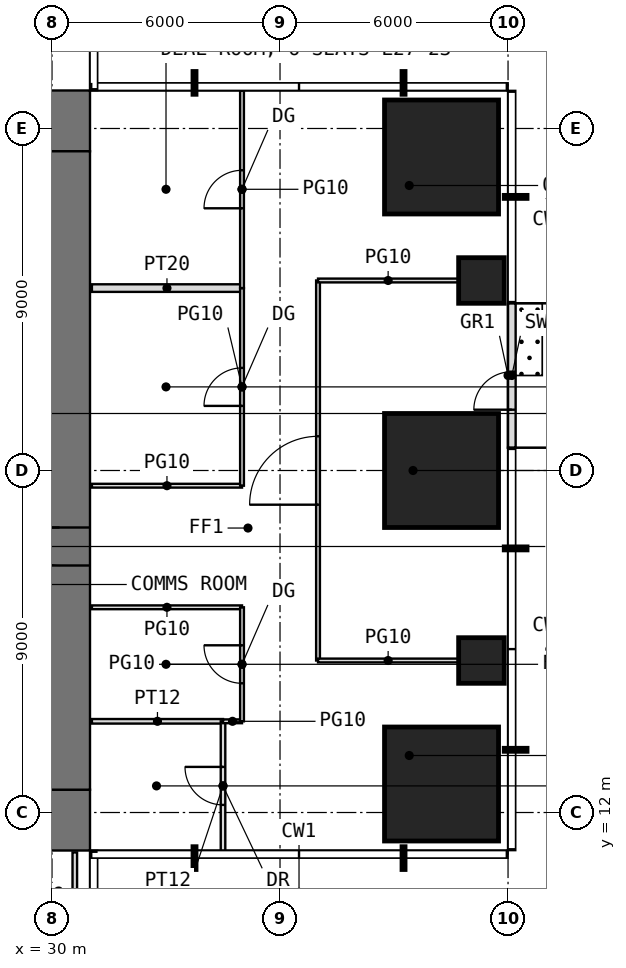
"""IFC4 building model, lengths in metres.
Left out: names, types, materials, properties, quantities, classifications, styles, units other than length and angle.
Written with IfcOpenShell. Run it as: python <this file> out.ifc"""

import sys

from ifc_helpers import new_model, si_unit, direction, frame, frame_2d, origin, origin_2d, place, context, subcontext, project, spatial, rectangle, extrude, element, fill, save


model = new_model("IFC4")
c1 = context("Model", 3, precision=1e-05, world=origin(), true_north=direction((0.0, 1.0)))
c2 = subcontext(c1, "Body", "Model", "MODEL_VIEW")
j1 = project(units=[si_unit("LENGTHUNIT", "METRE"), si_unit("PLANEANGLEUNIT", "RADIAN")], contexts=[c1])
p1 = place(None, origin())
s1 = spatial("IfcSite", under=j1, at=p1, CompositionType="ELEMENT")
p2 = place(p1, origin())
s2 = spatial("IfcBuilding", under=s1, at=p2, CompositionType="ELEMENT")
p3 = place(p2, frame((0.0, 0.0, 116.5)))
s3 = spatial("IfcBuildingStorey", under=s2, at=p3, CompositionType="ELEMENT", Elevation=116.5)
p4 = place(p3, frame((40.25, 12.75, 0.0), z_axis=(0.0, 0.0, 1.0), x_axis=(1.0, 0.0, 0.0)))
e1 = element("IfcColumn", 1, at=p4, inside=s3, PredefinedType="COLUMN", context=c2, shape_type="SweptSolid", body=[
    extrude(rectangle(XDim=3.0, YDim=3.0, at=origin_2d()), origin(), (0.0, 0.0, 1.0), 4.0),
])
p5 = place(p3, frame((41.3, 16.0, 0.0), z_axis=(0.0, 0.0, 1.0), x_axis=(1.0, 0.0, 0.0)))
e2 = element("IfcColumn", 2, at=p5, inside=s3, PredefinedType="COLUMN", context=c2, shape_type="SweptSolid", body=[
    extrude(rectangle(XDim=1.2, YDim=1.2, at=origin_2d()), origin(), (0.0, 0.0, 1.0), 4.0),
])
p6 = place(p3, frame((40.25, 21.0, 0.0), z_axis=(0.0, 0.0, 1.0), x_axis=(1.0, 0.0, 0.0)))
e3 = element("IfcColumn", 3, at=p6, inside=s3, PredefinedType="COLUMN", context=c2, shape_type="SweptSolid", body=[
    extrude(rectangle(XDim=3.0, YDim=3.0, at=origin_2d()), origin(), (0.0, 0.0, 1.0), 4.0),
])
p7 = place(p3, frame((41.3, 26.0, 0.0), z_axis=(0.0, 0.0, 1.0), x_axis=(1.0, 0.0, 0.0)))
e4 = element("IfcColumn", 4, at=p7, inside=s3, PredefinedType="COLUMN", context=c2, shape_type="SweptSolid", body=[
    extrude(rectangle(XDim=1.2, YDim=1.2, at=origin_2d()), origin(), (0.0, 0.0, 1.0), 4.0),
])
p8 = place(p3, frame((40.25, 29.25, 0.0), z_axis=(0.0, 0.0, 1.0), x_axis=(1.0, 0.0, 0.0)))
e5 = element("IfcColumn", 5, at=p8, inside=s3, PredefinedType="COLUMN", context=c2, shape_type="SweptSolid", body=[
    extrude(rectangle(XDim=3.0, YDim=3.0, at=origin_2d()), origin(), (0.0, 0.0, 1.0), 4.0),
])
p9 = place(p3, frame((42.1, 21.6, 0.0), z_axis=(0.0, 0.0, 1.0), x_axis=(0.0, 1.0, 0.0)))
e6 = element("IfcWall", 6, at=p9, inside=s3, PredefinedType="USERDEFINED", context=c2, shape_type="SweptSolid", body=[
    extrude(rectangle(XDim=3.8, YDim=0.2, at=frame_2d((1.9, 0.0))), origin(), (0.0, 0.0, 1.0), 3.75),
])
p10 = place(p9, frame((1.0, 0.0, 0.0)))
e7 = element("IfcOpeningElement", 7, at=p10, cuts=e6, PredefinedType="OPENING", context=c2, shape_type="SweptSolid", body=[
    extrude(rectangle(XDim=1.0, YDim=2.4, at=frame_2d((0.5, 1.2))), frame((0.0, 0.11, 0.0), z_axis=(0.0, -1.0, 0.0), x_axis=(1.0, 0.0, 0.0)), (0.0, 0.0, 1.0), 0.22),
])
p11 = place(p3, frame((11.0, 11.8, -0.05), z_axis=(0.0, 0.0, 1.0), x_axis=(1.0, 0.0, 0.0)))
e8 = element("IfcWall", 8, at=p11, inside=s3, PredefinedType="SHEAR", context=c2, shape_type="SweptSolid", body=[
    extrude(rectangle(XDim=20.0, YDim=1.6, at=frame_2d((10.0, 0.0))), origin(), (0.0, 0.0, 1.0), 4.0),
])
p12 = place(p11, frame((9.0, 0.0, 0.05)))
e9 = element("IfcOpeningElement", 9, at=p12, cuts=e8, PredefinedType="OPENING", context=c2, shape_type="SweptSolid", body=[
    extrude(rectangle(XDim=2.0, YDim=2.2, at=frame_2d((1.0, 1.1))), frame((0.0, 0.81, 0.0), z_axis=(0.0, -1.0, 0.0), x_axis=(1.0, 0.0, 0.0)), (0.0, 0.0, 1.0), 1.62),
])
p13 = place(p3, frame((11.0, 30.2, -0.05), z_axis=(0.0, 0.0, 1.0), x_axis=(1.0, 0.0, 0.0)))
e10 = element("IfcWall", 10, at=p13, inside=s3, PredefinedType="SHEAR", context=c2, shape_type="SweptSolid", body=[
    extrude(rectangle(XDim=20.0, YDim=1.6, at=frame_2d((10.0, 0.0))), origin(), (0.0, 0.0, 1.0), 4.0),
])
p14 = place(p13, frame((9.0, 0.0, 0.05)))
e11 = element("IfcOpeningElement", 11, at=p14, cuts=e10, PredefinedType="OPENING", context=c2, shape_type="SweptSolid", body=[
    extrude(rectangle(XDim=2.0, YDim=2.2, at=frame_2d((1.0, 1.1))), frame((0.0, 0.81, 0.0), z_axis=(0.0, -1.0, 0.0), x_axis=(1.0, 0.0, 0.0)), (0.0, 0.0, 1.0), 1.62),
])
p15 = place(p3, frame((30.2, 12.6, -0.05), z_axis=(0.0, 0.0, 1.0), x_axis=(0.0, 1.0, 0.0)))
e12 = element("IfcWall", 12, at=p15, inside=s3, PredefinedType="SHEAR", context=c2, shape_type="SweptSolid", body=[
    extrude(rectangle(XDim=16.8, YDim=1.6, at=frame_2d((8.4, 0.0))), origin(), (0.0, 0.0, 1.0), 4.0),
])
p16 = place(p15, frame((5.9, 0.0, 0.05)))
e13 = element("IfcOpeningElement", 13, at=p16, cuts=e12, PredefinedType="OPENING", context=c2, shape_type="SweptSolid", body=[
    extrude(rectangle(XDim=1.0, YDim=2.2, at=frame_2d((0.5, 1.1))), frame((0.0, 0.81, 0.0), z_axis=(0.0, -1.0, 0.0), x_axis=(1.0, 0.0, 0.0)), (0.0, 0.0, 1.0), 1.62),
])
for number, where, z_axis, x_axis in (
    (14, (30.6, 7.5, 0.0), (0.0, 0.0, 1.0), (0.0, 1.0, 0.0)),
    (15, (31.05, 14.4, 0.0), (0.0, 0.0, 1.0), (1.0, 0.0, 0.0)),
):
    element("IfcWall", number, at=place(p3, frame(where, z_axis=z_axis, x_axis=x_axis)), inside=s3, PredefinedType="PARTITIONING", context=c2, shape_type="SweptSolid", body=[
        extrude(rectangle(XDim=3.45, YDim=0.12, at=frame_2d((1.725, 0.0))), origin(), (0.0, 0.0, 1.0), 3.75),
    ])
for number, where, z_axis, x_axis in (
    (16, (31.05, 17.4, 0.0), (0.0, 0.0, 1.0), (1.0, 0.0, 0.0)),
    (17, (31.05, 20.6, 0.0), (0.0, 0.0, 1.0), (1.0, 0.0, 0.0)),
):
    element("IfcWall", number, at=place(p3, frame(where, z_axis=z_axis, x_axis=x_axis)), inside=s3, PredefinedType="PARTITIONING", context=c2, shape_type="SweptSolid", body=[
        extrude(rectangle(XDim=3.95, YDim=0.1, at=frame_2d((1.975, 0.0))), origin(), (0.0, 0.0, 1.0), 3.75),
    ])
p17 = place(p3, frame((31.05, 25.8, 0.0), z_axis=(0.0, 0.0, 1.0), x_axis=(1.0, 0.0, 0.0)))
e18 = element("IfcWall", 18, at=p17, inside=s3, PredefinedType="PARTITIONING", context=c2, shape_type="SweptSolid", body=[
    extrude(rectangle(XDim=3.95, YDim=0.2, at=frame_2d((1.975, 0.0))), origin(), (0.0, 0.0, 1.0), 3.75),
])
p18 = place(p3, frame((34.5, 11.0, 0.0), z_axis=(0.0, 0.0, 1.0), x_axis=(0.0, 1.0, 0.0)))
e19 = element("IfcWall", 19, at=p18, inside=s3, PredefinedType="PARTITIONING", context=c2, shape_type="SweptSolid", body=[
    extrude(rectangle(XDim=3.4, YDim=0.12, at=frame_2d((1.7, 0.0))), origin(), (0.0, 0.0, 1.0), 3.75),
])
p19 = place(p18, frame((1.2, 0.0, 0.0)))
e20 = element("IfcOpeningElement", 20, at=p19, cuts=e19, PredefinedType="OPENING", context=c2, shape_type="SweptSolid", body=[
    extrude(rectangle(XDim=1.0, YDim=2.2, at=frame_2d((0.5, 1.1))), frame((0.0, 0.07, 0.0), z_axis=(0.0, -1.0, 0.0), x_axis=(1.0, 0.0, 0.0)), (0.0, 0.0, 1.0), 0.14),
])
p20 = place(p3, frame((34.5, 14.4, 0.0), z_axis=(0.0, 0.0, 1.0), x_axis=(1.0, 0.0, 0.0)))
e21 = element("IfcWall", 21, at=p20, inside=s3, PredefinedType="PARTITIONING", context=c2, shape_type="SweptSolid", body=[
    extrude(rectangle(XDim=0.5, YDim=0.1, at=frame_2d((0.25, 0.0))), origin(), (0.0, 0.0, 1.0), 3.75),
])
p21 = place(p3, frame((35.0, 14.4, 0.0), z_axis=(0.0, 0.0, 1.0), x_axis=(0.0, 1.0, 0.0)))
e22 = element("IfcWall", 22, at=p21, inside=s3, PredefinedType="PARTITIONING", context=c2, shape_type="SweptSolid", body=[
    extrude(rectangle(XDim=3.0, YDim=0.1, at=frame_2d((1.5, 0.0))), origin(), (0.0, 0.0, 1.0), 3.75),
])
p22 = place(p21, frame((1.0, 0.0, 0.0)))
e23 = element("IfcOpeningElement", 23, at=p22, cuts=e22, PredefinedType="OPENING", context=c2, shape_type="SweptSolid", body=[
    extrude(rectangle(XDim=1.0, YDim=2.4, at=frame_2d((0.5, 1.2))), frame((0.0, 0.06, 0.0), z_axis=(0.0, -1.0, 0.0), x_axis=(1.0, 0.0, 0.0)), (0.0, 0.0, 1.0), 0.12),
])
p23 = place(p3, frame((35.0, 20.6, 0.0), z_axis=(0.0, 0.0, 1.0), x_axis=(0.0, 1.0, 0.0)))
e24 = element("IfcWall", 24, at=p23, inside=s3, PredefinedType="PARTITIONING", context=c2, shape_type="SweptSolid", body=[
    extrude(rectangle(XDim=5.2, YDim=0.1, at=frame_2d((2.6, 0.0))), origin(), (0.0, 0.0, 1.0), 3.75),
])
p24 = place(p23, frame((2.1, 0.0, 0.0)))
e25 = element("IfcOpeningElement", 25, at=p24, cuts=e24, PredefinedType="OPENING", context=c2, shape_type="SweptSolid", body=[
    extrude(rectangle(XDim=1.0, YDim=2.4, at=frame_2d((0.5, 1.2))), frame((0.0, 0.06, 0.0), z_axis=(0.0, -1.0, 0.0), x_axis=(1.0, 0.0, 0.0)), (0.0, 0.0, 1.0), 0.12),
])
p25 = place(p3, frame((35.0, 25.8, 0.0), z_axis=(0.0, 0.0, 1.0), x_axis=(0.0, 1.0, 0.0)))
e26 = element("IfcWall", 26, at=p25, inside=s3, PredefinedType="PARTITIONING", context=c2, shape_type="SweptSolid", body=[
    extrude(rectangle(XDim=5.2, YDim=0.1, at=frame_2d((2.6, 0.0))), origin(), (0.0, 0.0, 1.0), 3.75),
])
p26 = place(p25, frame((2.1, 0.0, 0.0)))
e27 = element("IfcOpeningElement", 27, at=p26, cuts=e26, PredefinedType="OPENING", context=c2, shape_type="SweptSolid", body=[
    extrude(rectangle(XDim=1.0, YDim=2.4, at=frame_2d((0.5, 1.2))), frame((0.0, 0.06, 0.0), z_axis=(0.0, -1.0, 0.0), x_axis=(1.0, 0.0, 0.0)), (0.0, 0.0, 1.0), 0.12),
])
p27 = place(p3, frame((37.0, 16.0, 0.0), z_axis=(0.0, 0.0, 1.0), x_axis=(0.0, 1.0, 0.0)))
e28 = element("IfcWall", 28, at=p27, inside=s3, PredefinedType="PARTITIONING", context=c2, shape_type="SweptSolid", body=[
    extrude(rectangle(XDim=10.0, YDim=0.1, at=frame_2d((5.0, 0.0))), origin(), (0.0, 0.0, 1.0), 3.75),
])
p28 = place(p27, frame((4.1, 0.0, 0.0)))
e29 = element("IfcOpeningElement", 29, at=p28, cuts=e28, PredefinedType="OPENING", context=c2, shape_type="SweptSolid", body=[
    extrude(rectangle(XDim=1.8, YDim=2.4, at=frame_2d((0.9, 1.2))), frame((0.0, 0.06, 0.0), z_axis=(0.0, -1.0, 0.0), x_axis=(1.0, 0.0, 0.0)), (0.0, 0.0, 1.0), 0.12),
])
for number, where, z_axis, x_axis in (
    (30, (37.0, 16.0, 0.0), (0.0, 0.0, 1.0), (1.0, 0.0, 0.0)),
    (31, (37.0, 26.0, 0.0), (0.0, 0.0, 1.0), (1.0, 0.0, 0.0)),
):
    element("IfcWall", number, at=place(p3, frame(where, z_axis=z_axis, x_axis=x_axis)), inside=s3, PredefinedType="PARTITIONING", context=c2, shape_type="SweptSolid", body=[
        extrude(rectangle(XDim=3.69, YDim=0.1, at=frame_2d((1.845, 0.0))), origin(), (0.0, 0.0, 1.0), 3.75),
    ])
p29 = place(p10, origin())
e32 = element("IfcDoor", 32, at=p29, inside=s3, OperationType="SINGLE_SWING_LEFT", PredefinedType="DOOR", context=c2, shape_type="SweptSolid", body=[
    extrude(rectangle(XDim=1.0, YDim=2.4, at=frame_2d((0.5, 1.2))), frame((0.0, 0.025, 0.0), z_axis=(0.0, -1.0, 0.0), x_axis=(1.0, 0.0, 0.0)), (0.0, 0.0, 1.0), 0.05),
])
fill(e7, e32)
p30 = place(p16, origin())
e33 = element("IfcDoor", 33, at=p30, inside=s3, OperationType="SINGLE_SWING_RIGHT", PredefinedType="DOOR", context=c2, shape_type="SweptSolid", body=[
    extrude(rectangle(XDim=1.0, YDim=2.2, at=frame_2d((0.5, 1.1))), frame((0.0, 0.025, 0.0), z_axis=(0.0, -1.0, 0.0), x_axis=(1.0, 0.0, 0.0)), (0.0, 0.0, 1.0), 0.05),
])
fill(e13, e33)
p31 = place(p19, origin())
e34 = element("IfcDoor", 34, at=p31, inside=s3, OperationType="SINGLE_SWING_RIGHT", PredefinedType="DOOR", context=c2, shape_type="SweptSolid", body=[
    extrude(rectangle(XDim=1.0, YDim=2.2, at=frame_2d((0.5, 1.1))), frame((0.0, 0.025, 0.0), z_axis=(0.0, -1.0, 0.0), x_axis=(1.0, 0.0, 0.0)), (0.0, 0.0, 1.0), 0.05),
])
fill(e20, e34)
p32 = place(p22, origin())
e35 = element("IfcDoor", 35, at=p32, inside=s3, OperationType="SINGLE_SWING_RIGHT", PredefinedType="DOOR", context=c2, shape_type="SweptSolid", body=[
    extrude(rectangle(XDim=1.0, YDim=2.4, at=frame_2d((0.5, 1.2))), frame((0.0, 0.025, 0.0), z_axis=(0.0, -1.0, 0.0), x_axis=(1.0, 0.0, 0.0)), (0.0, 0.0, 1.0), 0.05),
])
fill(e23, e35)
p33 = place(p24, origin())
e36 = element("IfcDoor", 36, at=p33, inside=s3, OperationType="SINGLE_SWING_LEFT", PredefinedType="DOOR", context=c2, shape_type="SweptSolid", body=[
    extrude(rectangle(XDim=1.0, YDim=2.4, at=frame_2d((0.5, 1.2))), frame((0.0, 0.025, 0.0), z_axis=(0.0, -1.0, 0.0), x_axis=(1.0, 0.0, 0.0)), (0.0, 0.0, 1.0), 0.05),
])
fill(e25, e36)
p34 = place(p26, origin())
e37 = element("IfcDoor", 37, at=p34, inside=s3, OperationType="SINGLE_SWING_LEFT", PredefinedType="DOOR", context=c2, shape_type="SweptSolid", body=[
    extrude(rectangle(XDim=1.0, YDim=2.4, at=frame_2d((0.5, 1.2))), frame((0.0, 0.025, 0.0), z_axis=(0.0, -1.0, 0.0), x_axis=(1.0, 0.0, 0.0)), (0.0, 0.0, 1.0), 0.05),
])
fill(e27, e37)
p35 = place(p28, origin())
e38 = element("IfcDoor", 38, at=p35, inside=s3, OperationType="DOUBLE_DOOR_SINGLE_SWING", PredefinedType="DOOR", context=c2, shape_type="SweptSolid", body=[
    extrude(rectangle(XDim=1.8, YDim=2.4, at=frame_2d((0.9, 1.2))), frame((0.0, 0.025, 0.0), z_axis=(0.0, -1.0, 0.0), x_axis=(1.0, 0.0, 0.0)), (0.0, 0.0, 1.0), 0.05),
])
fill(e29, e38)
save(model, sys.argv[1])
